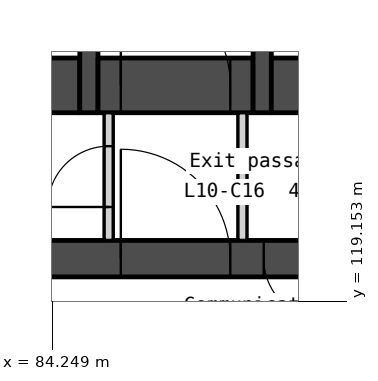
"""IFC4 building model, lengths in metres.
Left out: names, types, materials, properties, quantities, classifications, styles, units other than length and angle.
Written with IfcOpenShell. Run it as: python <this file> out.ifc"""

import sys

from ifc_helpers import new_model, si_unit, direction, frame, frame_2d, origin, place, context, subcontext, project, spatial, polyline, rectangle, outline, extrude, element, fill, save


model = new_model("IFC4")
c1 = context("Model", 3, precision=1e-05, world=origin(), true_north=direction((0.0, 1.0)))
c2 = subcontext(c1, "Body", "Model", "MODEL_VIEW")
j1 = project(units=[si_unit("LENGTHUNIT", "METRE"), si_unit("PLANEANGLEUNIT", "RADIAN")], contexts=[c1])
p1 = place(None, origin())
s1 = spatial("IfcSite", under=j1, at=p1, CompositionType="ELEMENT")
p2 = place(p1, origin())
s2 = spatial("IfcBuilding", under=s1, at=p2, CompositionType="ELEMENT")
p3 = place(p2, frame((0.0, 0.0, 49.0)))
s3 = spatial("IfcBuildingStorey", under=s2, at=p3, CompositionType="ELEMENT", Elevation=49.0)
p4 = place(p3, frame((66.0, 119.85, 0.0), z_axis=(0.0, 0.0, 1.0), x_axis=(1.0, 0.0, 0.0)))
e1 = element("IfcWall", 1, at=p4, inside=s3, PredefinedType="SOLIDWALL", context=c2, shape_type="SweptSolid", body=[
    extrude(rectangle(XDim=28.0, YDim=0.6, at=frame_2d((14.0, 0.0))), origin(), (0.0, 0.0, 1.0), 3.35),
])
p5 = place(p4, frame((6.825, 0.0, 0.0)))
e2 = element("IfcOpeningElement", 2, at=p5, cuts=e1, PredefinedType="OPENING", context=c2, shape_type="SweptSolid", body=[
    extrude(rectangle(XDim=1.8, YDim=2.1, at=frame_2d((0.9, 1.05))), frame((0.0, 0.31, 0.0), z_axis=(0.0, -1.0, 0.0), x_axis=(1.0, 0.0, 0.0)), (0.0, 0.0, 1.0), 0.62),
])
p6 = place(p4, frame((15.85, 0.0, 0.0)))
e3 = element("IfcOpeningElement", 3, at=p6, cuts=e1, PredefinedType="OPENING", context=c2, shape_type="SweptSolid", body=[
    extrude(rectangle(XDim=1.5, YDim=2.1, at=frame_2d((0.75, 1.05))), frame((0.0, 0.31, 0.0), z_axis=(0.0, -1.0, 0.0), x_axis=(1.0, 0.0, 0.0)), (0.0, 0.0, 1.0), 0.62),
])
p7 = place(p4, frame((19.375, 0.0, 0.0)))
e4 = element("IfcOpeningElement", 4, at=p7, cuts=e1, PredefinedType="OPENING", context=c2, shape_type="SweptSolid", body=[
    extrude(rectangle(XDim=1.8, YDim=2.1, at=frame_2d((0.9, 1.05))), frame((0.0, 0.31, 0.0), z_axis=(0.0, -1.0, 0.0), x_axis=(1.0, 0.0, 0.0)), (0.0, 0.0, 1.0), 0.62),
])
p8 = place(p4, frame((4.425, 0.0, 0.0)))
e5 = element("IfcOpeningElement", 5, at=p8, cuts=e1, PredefinedType="OPENING", context=c2, shape_type="SweptSolid", body=[
    extrude(rectangle(XDim=1.0, YDim=2.1, at=frame_2d((0.5, 1.05))), frame((0.0, 0.31, 0.0), z_axis=(0.0, -1.0, 0.0), x_axis=(1.0, 0.0, 0.0)), (0.0, 0.0, 1.0), 0.62),
])
p9 = place(p4, frame((9.783, 0.0, 0.0)))
e6 = element("IfcOpeningElement", 6, at=p9, cuts=e1, PredefinedType="OPENING", context=c2, shape_type="SweptSolid", body=[
    extrude(rectangle(XDim=1.0, YDim=2.1, at=frame_2d((0.5, 1.05))), frame((0.0, 0.31, 0.0), z_axis=(0.0, -1.0, 0.0), x_axis=(1.0, 0.0, 0.0)), (0.0, 0.0, 1.0), 0.62),
])
p10 = place(p4, frame((11.525, 0.0, 0.0)))
e7 = element("IfcOpeningElement", 7, at=p10, cuts=e1, PredefinedType="OPENING", context=c2, shape_type="SweptSolid", body=[
    extrude(rectangle(XDim=1.0, YDim=2.1, at=frame_2d((0.5, 1.05))), frame((0.0, 0.31, 0.0), z_axis=(0.0, -1.0, 0.0), x_axis=(1.0, 0.0, 0.0)), (0.0, 0.0, 1.0), 0.62),
])
p11 = place(p4, frame((13.658, 0.0, 0.0)))
e8 = element("IfcOpeningElement", 8, at=p11, cuts=e1, PredefinedType="OPENING", context=c2, shape_type="SweptSolid", body=[
    extrude(rectangle(XDim=1.0, YDim=2.1, at=frame_2d((0.5, 1.05))), frame((0.0, 0.31, 0.0), z_axis=(0.0, -1.0, 0.0), x_axis=(1.0, 0.0, 0.0)), (0.0, 0.0, 1.0), 0.62),
])
p12 = place(p4, frame((21.725, 0.0, 0.0)))
e9 = element("IfcOpeningElement", 9, at=p12, cuts=e1, PredefinedType="OPENING", context=c2, shape_type="SweptSolid", body=[
    extrude(rectangle(XDim=1.0, YDim=2.1, at=frame_2d((0.5, 1.05))), frame((0.0, 0.31, 0.0), z_axis=(0.0, -1.0, 0.0), x_axis=(1.0, 0.0, 0.0)), (0.0, 0.0, 1.0), 0.62),
])
p13 = place(p4, frame((23.425, 0.0, 0.0)))
e10 = element("IfcOpeningElement", 10, at=p13, cuts=e1, PredefinedType="OPENING", context=c2, shape_type="SweptSolid", body=[
    extrude(rectangle(XDim=1.0, YDim=2.1, at=frame_2d((0.5, 1.05))), frame((0.0, 0.31, 0.0), z_axis=(0.0, -1.0, 0.0), x_axis=(1.0, 0.0, 0.0)), (0.0, 0.0, 1.0), 0.62),
])
p14 = place(p3, frame((81.8, 122.7, 0.0), z_axis=(0.0, 0.0, 1.0), x_axis=(1.0, 0.0, 0.0)))
e11 = element("IfcWall", 11, at=p14, inside=s3, PredefinedType="SOLIDWALL", context=c2, shape_type="SweptSolid", body=[
    extrude(rectangle(XDim=2.9, YDim=0.9, at=frame_2d((1.45, 0.0))), origin(), (0.0, 0.0, 1.0), 3.35),
])
p15 = place(p14, frame((0.05, 0.0, 0.0)))
e12 = element("IfcOpeningElement", 12, at=p15, cuts=e11, PredefinedType="OPENING", context=c2, shape_type="SweptSolid", body=[
    extrude(rectangle(XDim=1.5, YDim=2.1, at=frame_2d((0.75, 1.05))), frame((0.0, 0.46, 0.0), z_axis=(0.0, -1.0, 0.0), x_axis=(1.0, 0.0, 0.0)), (0.0, 0.0, 1.0), 0.92),
])
p16 = place(p3, frame((84.85, 133.95, 0.0), z_axis=(0.0, 0.0, 1.0), x_axis=(0.0, -1.0, 0.0)))
e13 = element("IfcWall", 13, at=p16, inside=s3, PredefinedType="SOLIDWALL", context=c2, shape_type="SweptSolid", body=[
    extrude(rectangle(XDim=11.7, YDim=0.3, at=frame_2d((5.85, 0.0))), origin(), (0.0, 0.0, 1.0), 3.35),
])
p17 = place(p3, frame((85.0, 122.7, 0.0), z_axis=(0.0, 0.0, 1.0), x_axis=(1.0, 0.0, 0.0)))
e14 = element("IfcWall", 14, at=p17, inside=s3, PredefinedType="SOLIDWALL", context=c2, shape_type="SweptSolid", body=[
    extrude(rectangle(XDim=2.55, YDim=0.9, at=frame_2d((1.275, 0.0))), origin(), (0.0, 0.0, 1.0), 3.35),
])
p18 = place(p17, frame((0.375, 0.0, 0.0)))
e15 = element("IfcOpeningElement", 15, at=p18, cuts=e14, PredefinedType="OPENING", context=c2, shape_type="SweptSolid", body=[
    extrude(rectangle(XDim=1.8, YDim=2.1, at=frame_2d((0.9, 1.05))), frame((0.0, 0.46, 0.0), z_axis=(0.0, -1.0, 0.0), x_axis=(1.0, 0.0, 0.0)), (0.0, 0.0, 1.0), 0.92),
])
p19 = place(p3, frame((85.175, 122.25, 0.0), z_axis=(0.0, 0.0, 1.0), x_axis=(0.0, -1.0, 0.0)))
e16 = element("IfcWall", 16, at=p19, inside=s3, PredefinedType="PARTITIONING", context=c2, shape_type="SweptSolid", body=[
    extrude(rectangle(XDim=2.1, YDim=0.15, at=frame_2d((1.05, 0.0))), origin(), (0.0, 0.0, 1.0), 3.35),
])
p20 = place(p19, frame((0.55, 0.0, 0.0)))
e17 = element("IfcOpeningElement", 17, at=p20, cuts=e16, PredefinedType="OPENING", context=c2, shape_type="SweptSolid", body=[
    extrude(rectangle(XDim=1.0, YDim=2.1, at=frame_2d((0.5, 1.05))), frame((0.0, 0.085, 0.0), z_axis=(0.0, -1.0, 0.0), x_axis=(1.0, 0.0, 0.0)), (0.0, 0.0, 1.0), 0.17),
])
p21 = place(p3, frame((87.375, 122.25, 0.0), z_axis=(0.0, 0.0, 1.0), x_axis=(0.0, -1.0, 0.0)))
e18 = element("IfcWall", 18, at=p21, inside=s3, PredefinedType="PARTITIONING", context=c2, shape_type="SweptSolid", body=[
    extrude(rectangle(XDim=2.1, YDim=0.15, at=frame_2d((1.05, 0.0))), origin(), (0.0, 0.0, 1.0), 3.35),
])
p22 = place(p3, frame((87.7, 133.95, 0.0), z_axis=(0.0, 0.0, 1.0), x_axis=(0.0, -1.0, 0.0)))
e19 = element("IfcWall", 19, at=p22, inside=s3, PredefinedType="SOLIDWALL", context=c2, shape_type="SweptSolid", body=[
    extrude(rectangle(XDim=11.7, YDim=0.3, at=frame_2d((5.85, 0.0))), origin(), (0.0, 0.0, 1.0), 3.35),
])
p23 = place(p22, frame((6.95, 0.0, 0.0)))
e20 = element("IfcOpeningElement", 20, at=p23, cuts=e19, PredefinedType="OPENING", context=c2, shape_type="SweptSolid", body=[
    extrude(rectangle(XDim=1.1, YDim=2.1, at=frame_2d((0.55, 1.05))), frame((0.0, 0.16, 0.0), z_axis=(0.0, -1.0, 0.0), x_axis=(1.0, 0.0, 0.0)), (0.0, 0.0, 1.0), 0.32),
])
p24 = place(p22, frame((5.1, 0.0, 0.0)))
e21 = element("IfcOpeningElement", 21, at=p24, cuts=e19, PredefinedType="OPENING", context=c2, shape_type="SweptSolid", body=[
    extrude(rectangle(XDim=1.0, YDim=2.1, at=frame_2d((0.5, 1.05))), frame((0.0, 0.16, 0.0), z_axis=(0.0, -1.0, 0.0), x_axis=(1.0, 0.0, 0.0)), (0.0, 0.0, 1.0), 0.32),
])
p25 = place(p22, frame((9.25, 0.0, 0.0)))
e22 = element("IfcOpeningElement", 22, at=p25, cuts=e19, PredefinedType="OPENING", context=c2, shape_type="SweptSolid", body=[
    extrude(rectangle(XDim=1.1, YDim=2.1, at=frame_2d((0.55, 1.05))), frame((0.0, 0.16, 0.0), z_axis=(0.0, -1.0, 0.0), x_axis=(1.0, 0.0, 0.0)), (0.0, 0.0, 1.0), 0.32),
])
p26 = place(p3, frame((87.85, 122.7, 0.0), z_axis=(0.0, 0.0, 1.0), x_axis=(1.0, 0.0, 0.0)))
e23 = element("IfcWall", 23, at=p26, inside=s3, PredefinedType="SOLIDWALL", context=c2, shape_type="SweptSolid", body=[
    extrude(rectangle(XDim=2.55, YDim=0.9, at=frame_2d((1.275, 0.0))), origin(), (0.0, 0.0, 1.0), 3.35),
])
p27 = place(p3, frame((83.105, 90.599, -0.15), z_axis=(0.0, 0.0, 1.0), x_axis=(0.499999201451, 0.866025864826, 0.0)))
e24 = element("IfcWall", 24, at=p27, inside=s3, PredefinedType="SOLIDWALL", context=c2, shape_type="SweptSolid", body=[
    extrude(outline(polyline([(44.8, 0.0), (44.8, 3.5), (0.0, 3.5), (0.0, 0.0), (44.8, 0.0)])), frame((0.0, 0.225, 0.0), z_axis=(0.0, -1.0, 0.0), x_axis=(1.0, 0.0, 0.0)), (0.0, 0.0, 1.0), 0.45),
])
p28 = place(p27, frame((2.43, 0.0, 1.05)))
e25 = element("IfcOpeningElement", 25, at=p28, cuts=e24, PredefinedType="OPENING", context=c2, shape_type="SweptSolid", body=[
    extrude(rectangle(XDim=1.8, YDim=1.5, at=frame_2d((0.9, 0.75))), frame((0.0, 0.235, 0.0), z_axis=(0.0, -1.0, 0.0), x_axis=(1.0, 0.0, 0.0)), (0.0, 0.0, 1.0), 0.47),
])
p29 = place(p27, frame((4.73, 0.0, 1.05)))
e26 = element("IfcOpeningElement", 26, at=p29, cuts=e24, PredefinedType="OPENING", context=c2, shape_type="SweptSolid", body=[
    extrude(rectangle(XDim=1.8, YDim=1.5, at=frame_2d((0.9, 0.75))), frame((0.0, 0.235, 0.0), z_axis=(0.0, -1.0, 0.0), x_axis=(1.0, 0.0, 0.0)), (0.0, 0.0, 1.0), 0.47),
])
p30 = place(p27, frame((11.39, 0.0, 1.05)))
e27 = element("IfcOpeningElement", 27, at=p30, cuts=e24, PredefinedType="OPENING", context=c2, shape_type="SweptSolid", body=[
    extrude(rectangle(XDim=1.8, YDim=1.5, at=frame_2d((0.9, 0.75))), frame((0.0, 0.235, 0.0), z_axis=(0.0, -1.0, 0.0), x_axis=(1.0, 0.0, 0.0)), (0.0, 0.0, 1.0), 0.47),
])
p31 = place(p27, frame((13.69, 0.0, 1.05)))
e28 = element("IfcOpeningElement", 28, at=p31, cuts=e24, PredefinedType="OPENING", context=c2, shape_type="SweptSolid", body=[
    extrude(rectangle(XDim=1.8, YDim=1.5, at=frame_2d((0.9, 0.75))), frame((0.0, 0.235, 0.0), z_axis=(0.0, -1.0, 0.0), x_axis=(1.0, 0.0, 0.0)), (0.0, 0.0, 1.0), 0.47),
])
p32 = place(p27, frame((20.35, 0.0, 1.05)))
e29 = element("IfcOpeningElement", 29, at=p32, cuts=e24, PredefinedType="OPENING", context=c2, shape_type="SweptSolid", body=[
    extrude(rectangle(XDim=1.8, YDim=1.5, at=frame_2d((0.9, 0.75))), frame((0.0, 0.235, 0.0), z_axis=(0.0, -1.0, 0.0), x_axis=(1.0, 0.0, 0.0)), (0.0, 0.0, 1.0), 0.47),
])
p33 = place(p27, frame((22.65, 0.0, 1.05)))
e30 = element("IfcOpeningElement", 30, at=p33, cuts=e24, PredefinedType="OPENING", context=c2, shape_type="SweptSolid", body=[
    extrude(rectangle(XDim=1.8, YDim=1.5, at=frame_2d((0.9, 0.75))), frame((0.0, 0.235, 0.0), z_axis=(0.0, -1.0, 0.0), x_axis=(1.0, 0.0, 0.0)), (0.0, 0.0, 1.0), 0.47),
])
p34 = place(p27, frame((29.31, 0.0, 1.05)))
e31 = element("IfcOpeningElement", 31, at=p34, cuts=e24, PredefinedType="OPENING", context=c2, shape_type="SweptSolid", body=[
    extrude(rectangle(XDim=1.8, YDim=1.5, at=frame_2d((0.9, 0.75))), frame((0.0, 0.235, 0.0), z_axis=(0.0, -1.0, 0.0), x_axis=(1.0, 0.0, 0.0)), (0.0, 0.0, 1.0), 0.47),
])
p35 = place(p27, frame((31.61, 0.0, 1.05)))
e32 = element("IfcOpeningElement", 32, at=p35, cuts=e24, PredefinedType="OPENING", context=c2, shape_type="SweptSolid", body=[
    extrude(rectangle(XDim=1.8, YDim=1.5, at=frame_2d((0.9, 0.75))), frame((0.0, 0.235, 0.0), z_axis=(0.0, -1.0, 0.0), x_axis=(1.0, 0.0, 0.0)), (0.0, 0.0, 1.0), 0.47),
])
p36 = place(p27, frame((38.27, 0.0, 1.05)))
e33 = element("IfcOpeningElement", 33, at=p36, cuts=e24, PredefinedType="OPENING", context=c2, shape_type="SweptSolid", body=[
    extrude(rectangle(XDim=1.8, YDim=1.5, at=frame_2d((0.9, 0.75))), frame((0.0, 0.235, 0.0), z_axis=(0.0, -1.0, 0.0), x_axis=(1.0, 0.0, 0.0)), (0.0, 0.0, 1.0), 0.47),
])
p37 = place(p27, frame((40.57, 0.0, 1.05)))
e34 = element("IfcOpeningElement", 34, at=p37, cuts=e24, PredefinedType="OPENING", context=c2, shape_type="SweptSolid", body=[
    extrude(rectangle(XDim=1.8, YDim=1.5, at=frame_2d((0.9, 0.75))), frame((0.0, 0.235, 0.0), z_axis=(0.0, -1.0, 0.0), x_axis=(1.0, 0.0, 0.0)), (0.0, 0.0, 1.0), 0.47),
])
p38 = place(p18, origin())
e35 = element("IfcDoor", 35, at=p38, inside=s3, OperationType="DOUBLE_DOOR_DOUBLE_SWING", PredefinedType="DOOR", context=c2, shape_type="SweptSolid", body=[
    extrude(rectangle(XDim=1.8, YDim=2.1, at=frame_2d((0.9, 1.05))), frame((0.0, 0.025, 0.0), z_axis=(0.0, -1.0, 0.0), x_axis=(1.0, 0.0, 0.0)), (0.0, 0.0, 1.0), 0.05),
])
fill(e15, e35)
p39 = place(p7, origin())
e36 = element("IfcDoor", 36, at=p39, inside=s3, OperationType="DOUBLE_DOOR_DOUBLE_SWING", PredefinedType="DOOR", context=c2, shape_type="SweptSolid", body=[
    extrude(rectangle(XDim=1.8, YDim=2.1, at=frame_2d((0.9, 1.05))), frame((0.0, 0.025, 0.0), z_axis=(0.0, -1.0, 0.0), x_axis=(1.0, 0.0, 0.0)), (0.0, 0.0, 1.0), 0.05),
])
fill(e4, e36)
p40 = place(p20, origin())
e37 = element("IfcDoor", 37, at=p40, inside=s3, OperationType="SINGLE_SWING_RIGHT", PredefinedType="DOOR", context=c2, shape_type="SweptSolid", body=[
    extrude(rectangle(XDim=1.0, YDim=2.1, at=frame_2d((0.5, 1.05))), frame((0.0, 0.025, 0.0), z_axis=(0.0, -1.0, 0.0), x_axis=(1.0, 0.0, 0.0)), (0.0, 0.0, 1.0), 0.05),
])
fill(e17, e37)
p41 = place(p12, origin())
e38 = element("IfcDoor", 38, at=p41, inside=s3, OperationType="SINGLE_SWING_RIGHT", PredefinedType="DOOR", context=c2, shape_type="SweptSolid", body=[
    extrude(rectangle(XDim=1.0, YDim=2.1, at=frame_2d((0.5, 1.05))), frame((0.0, 0.025, 0.0), z_axis=(0.0, -1.0, 0.0), x_axis=(1.0, 0.0, 0.0)), (0.0, 0.0, 1.0), 0.05),
])
fill(e9, e38)
save(model, sys.argv[1])
